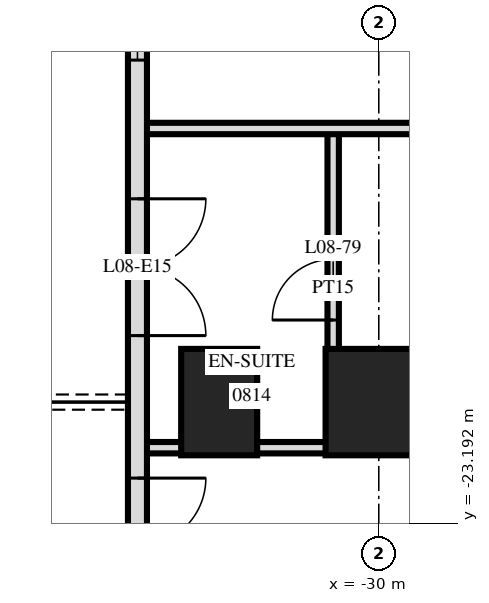
"""IFC4 building model, lengths in metres.
Left out: names, types, materials, properties, quantities, classifications, styles, units other than length and angle.
Written with IfcOpenShell. Run it as: python <this file> out.ifc"""

import sys

from ifc_helpers import new_model, si_unit, direction, frame, frame_2d, origin, origin_2d, place, context, subcontext, project, spatial, rectangle, extrude, element, fill, save


model = new_model("IFC4")
c1 = context("Model", 3, precision=1e-05, world=origin(), true_north=direction((0.0, 1.0)))
c2 = subcontext(c1, "Body", "Model", "MODEL_VIEW")
j1 = project(units=[si_unit("LENGTHUNIT", "METRE"), si_unit("PLANEANGLEUNIT", "RADIAN")], contexts=[c1])
p1 = place(None, origin())
s1 = spatial("IfcSite", under=j1, at=p1, CompositionType="ELEMENT")
p2 = place(p1, origin())
s2 = spatial("IfcBuilding", under=s1, at=p2, CompositionType="ELEMENT")
p3 = place(p2, frame((0.0, 0.0, 38.4)))
s3 = spatial("IfcBuildingStorey", under=s2, at=p3, CompositionType="ELEMENT", Elevation=38.4)
p4 = place(p3, frame((-32.1, -21.6, 0.0), z_axis=(0.0, 0.0, 1.0), x_axis=(0.0, 1.0, 0.0)))
e1 = element("IfcColumn", 1, at=p4, inside=s3, PredefinedType="COLUMN", context=c2, shape_type="SweptSolid", body=[
    extrude(rectangle(XDim=1.4, YDim=1.0, at=origin_2d()), origin(), (0.0, 0.0, 1.0), 3.6),
])
p5 = place(p3, frame((-30.0, -21.6, 0.0), z_axis=(0.0, 0.0, 1.0), x_axis=(1.0, 0.0, 0.0)))
e2 = element("IfcColumn", 2, at=p5, inside=s3, PredefinedType="COLUMN", context=c2, shape_type="SweptSolid", body=[
    extrude(rectangle(XDim=1.4, YDim=1.4, at=origin_2d()), origin(), (0.0, 0.0, 1.0), 3.6),
])
p6 = place(p3, frame((-33.175, -3.325, 0.0), z_axis=(0.0, 0.0, 1.0), x_axis=(0.0, -1.0, 0.0)))
e3 = element("IfcWall", 3, at=p6, inside=s3, PredefinedType="SOLIDWALL", context=c2, shape_type="SweptSolid", body=[
    extrude(rectangle(XDim=21.551, YDim=0.25, at=frame_2d((10.775, 0.0))), origin(), (0.0, 0.0, 1.0), 3.32),
])
p7 = place(p6, frame((6.575, 0.0, 0.0)))
e4 = element("IfcOpeningElement", 4, at=p7, cuts=e3, PredefinedType="OPENING", context=c2, shape_type="SweptSolid", body=[
    extrude(rectangle(XDim=1.8, YDim=2.4, at=frame_2d((0.9, 1.2))), frame((0.0, 0.135, 0.0), z_axis=(0.0, -1.0, 0.0), x_axis=(1.0, 0.0, 0.0)), (0.0, 0.0, 1.0), 0.27),
])
p8 = place(p6, frame((9.425, 0.0, 0.3)))
e5 = element("IfcOpeningElement", 5, at=p8, cuts=e3, PredefinedType="OPENING", context=c2, shape_type="SweptSolid", body=[
    extrude(rectangle(XDim=1.8, YDim=2.1, at=frame_2d((0.9, 1.05))), frame((0.0, 0.135, 0.0), z_axis=(0.0, -1.0, 0.0), x_axis=(1.0, 0.0, 0.0)), (0.0, 0.0, 1.0), 0.27),
])
p9 = place(p6, frame((12.575, 0.0, 0.3)))
e6 = element("IfcOpeningElement", 6, at=p9, cuts=e3, PredefinedType="OPENING", context=c2, shape_type="SweptSolid", body=[
    extrude(rectangle(XDim=1.2, YDim=2.1, at=frame_2d((0.6, 1.05))), frame((0.0, 0.135, 0.0), z_axis=(0.0, -1.0, 0.0), x_axis=(1.0, 0.0, 0.0)), (0.0, 0.0, 1.0), 0.27),
])
p10 = place(p6, frame((15.6, 0.0, 0.0)))
e7 = element("IfcOpeningElement", 7, at=p10, cuts=e3, PredefinedType="OPENING", context=c2, shape_type="SweptSolid", body=[
    extrude(rectangle(XDim=1.8, YDim=2.4, at=frame_2d((0.9, 1.2))), frame((0.0, 0.135, 0.0), z_axis=(0.0, -1.0, 0.0), x_axis=(1.0, 0.0, 0.0)), (0.0, 0.0, 1.0), 0.27),
])
p11 = place(p6, frame((19.275, 0.0, 0.0)))
e8 = element("IfcOpeningElement", 8, at=p11, cuts=e3, PredefinedType="OPENING", context=c2, shape_type="SweptSolid", body=[
    extrude(rectangle(XDim=1.8, YDim=2.4, at=frame_2d((0.9, 1.2))), frame((0.0, 0.135, 0.0), z_axis=(0.0, -1.0, 0.0), x_axis=(1.0, 0.0, 0.0)), (0.0, 0.0, 1.0), 0.27),
])
p12 = place(p3, frame((-30.6, -22.2, 0.0), z_axis=(0.0, 0.0, 1.0), x_axis=(0.0, 1.0, 0.0)))
e9 = element("IfcWall", 9, at=p12, inside=s3, PredefinedType="PARTITIONING", context=c2, shape_type="SweptSolid", body=[
    extrude(rectangle(XDim=4.2, YDim=0.15, at=frame_2d((2.1, 0.0))), origin(), (0.0, 0.0, 1.0), 3.32),
])
p13 = place(p12, frame((1.68, 0.0, 0.0)))
e10 = element("IfcOpeningElement", 10, at=p13, cuts=e9, PredefinedType="OPENING", context=c2, shape_type="SweptSolid", body=[
    extrude(rectangle(XDim=0.8, YDim=2.1, at=frame_2d((0.4, 1.05))), frame((0.0, 0.085, 0.0), z_axis=(0.0, -1.0, 0.0), x_axis=(1.0, 0.0, 0.0)), (0.0, 0.0, 1.0), 0.17),
])
p14 = place(p3, frame((-33.12, -22.2, 0.0), z_axis=(0.0, 0.0, 1.0), x_axis=(1.0, 0.0, 0.0)))
e11 = element("IfcWall", 11, at=p14, inside=s3, PredefinedType="PARTITIONING", context=c2, shape_type="SweptSolid", body=[
    extrude(rectangle(XDim=2.52, YDim=0.15, at=frame_2d((1.26, 0.0))), origin(), (0.0, 0.0, 1.0), 3.32),
])
p15 = place(p3, frame((-33.12, -18.0, 0.0), z_axis=(0.0, 0.0, 1.0), x_axis=(1.0, 0.0, 0.0)))
e12 = element("IfcWall", 12, at=p15, inside=s3, PredefinedType="PARTITIONING", context=c2, shape_type="SweptSolid", body=[
    extrude(rectangle(XDim=66.24, YDim=0.15, at=frame_2d((33.12, 0.0))), origin(), (0.0, 0.0, 1.0), 3.32),
])
p16 = place(p15, frame((12.27, 0.0, 0.0)))
e13 = element("IfcOpeningElement", 13, at=p16, cuts=e12, PredefinedType="OPENING", context=c2, shape_type="SweptSolid", body=[
    extrude(rectangle(XDim=1.0, YDim=2.1, at=frame_2d((0.5, 1.05))), frame((0.0, 0.085, 0.0), z_axis=(0.0, -1.0, 0.0), x_axis=(1.0, 0.0, 0.0)), (0.0, 0.0, 1.0), 0.17),
])
p17 = place(p15, frame((16.97, 0.0, 0.0)))
e14 = element("IfcOpeningElement", 14, at=p17, cuts=e12, PredefinedType="OPENING", context=c2, shape_type="SweptSolid", body=[
    extrude(rectangle(XDim=1.0, YDim=2.1, at=frame_2d((0.5, 1.05))), frame((0.0, 0.085, 0.0), z_axis=(0.0, -1.0, 0.0), x_axis=(1.0, 0.0, 0.0)), (0.0, 0.0, 1.0), 0.17),
])
p18 = place(p15, frame((18.27, 0.0, 0.0)))
e15 = element("IfcOpeningElement", 15, at=p18, cuts=e12, PredefinedType="OPENING", context=c2, shape_type="SweptSolid", body=[
    extrude(rectangle(XDim=1.0, YDim=2.1, at=frame_2d((0.5, 1.05))), frame((0.0, 0.085, 0.0), z_axis=(0.0, -1.0, 0.0), x_axis=(1.0, 0.0, 0.0)), (0.0, 0.0, 1.0), 0.17),
])
p19 = place(p15, frame((22.97, 0.0, 0.0)))
e16 = element("IfcOpeningElement", 16, at=p19, cuts=e12, PredefinedType="OPENING", context=c2, shape_type="SweptSolid", body=[
    extrude(rectangle(XDim=1.0, YDim=2.1, at=frame_2d((0.5, 1.05))), frame((0.0, 0.085, 0.0), z_axis=(0.0, -1.0, 0.0), x_axis=(1.0, 0.0, 0.0)), (0.0, 0.0, 1.0), 0.17),
])
p20 = place(p15, frame((24.27, 0.0, 0.0)))
e17 = element("IfcOpeningElement", 17, at=p20, cuts=e12, PredefinedType="OPENING", context=c2, shape_type="SweptSolid", body=[
    extrude(rectangle(XDim=1.0, YDim=2.1, at=frame_2d((0.5, 1.05))), frame((0.0, 0.085, 0.0), z_axis=(0.0, -1.0, 0.0), x_axis=(1.0, 0.0, 0.0)), (0.0, 0.0, 1.0), 0.17),
])
p21 = place(p15, frame((28.97, 0.0, 0.0)))
e18 = element("IfcOpeningElement", 18, at=p21, cuts=e12, PredefinedType="OPENING", context=c2, shape_type="SweptSolid", body=[
    extrude(rectangle(XDim=1.0, YDim=2.1, at=frame_2d((0.5, 1.05))), frame((0.0, 0.085, 0.0), z_axis=(0.0, -1.0, 0.0), x_axis=(1.0, 0.0, 0.0)), (0.0, 0.0, 1.0), 0.17),
])
p22 = place(p15, frame((30.27, 0.0, 0.0)))
e19 = element("IfcOpeningElement", 19, at=p22, cuts=e12, PredefinedType="OPENING", context=c2, shape_type="SweptSolid", body=[
    extrude(rectangle(XDim=1.0, YDim=2.1, at=frame_2d((0.5, 1.05))), frame((0.0, 0.085, 0.0), z_axis=(0.0, -1.0, 0.0), x_axis=(1.0, 0.0, 0.0)), (0.0, 0.0, 1.0), 0.17),
])
p23 = place(p15, frame((34.97, 0.0, 0.0)))
e20 = element("IfcOpeningElement", 20, at=p23, cuts=e12, PredefinedType="OPENING", context=c2, shape_type="SweptSolid", body=[
    extrude(rectangle(XDim=1.0, YDim=2.1, at=frame_2d((0.5, 1.05))), frame((0.0, 0.085, 0.0), z_axis=(0.0, -1.0, 0.0), x_axis=(1.0, 0.0, 0.0)), (0.0, 0.0, 1.0), 0.17),
])
p24 = place(p15, frame((37.27, 0.0, 0.0)))
e21 = element("IfcOpeningElement", 21, at=p24, cuts=e12, PredefinedType="OPENING", context=c2, shape_type="SweptSolid", body=[
    extrude(rectangle(XDim=1.0, YDim=2.1, at=frame_2d((0.5, 1.05))), frame((0.0, 0.085, 0.0), z_axis=(0.0, -1.0, 0.0), x_axis=(1.0, 0.0, 0.0)), (0.0, 0.0, 1.0), 0.17),
])
p25 = place(p15, frame((43.97, 0.0, 0.0)))
e22 = element("IfcOpeningElement", 22, at=p25, cuts=e12, PredefinedType="OPENING", context=c2, shape_type="SweptSolid", body=[
    extrude(rectangle(XDim=1.0, YDim=2.1, at=frame_2d((0.5, 1.05))), frame((0.0, 0.085, 0.0), z_axis=(0.0, -1.0, 0.0), x_axis=(1.0, 0.0, 0.0)), (0.0, 0.0, 1.0), 0.17),
])
p26 = place(p15, frame((45.27, 0.0, 0.0)))
e23 = element("IfcOpeningElement", 23, at=p26, cuts=e12, PredefinedType="OPENING", context=c2, shape_type="SweptSolid", body=[
    extrude(rectangle(XDim=1.0, YDim=2.1, at=frame_2d((0.5, 1.05))), frame((0.0, 0.085, 0.0), z_axis=(0.0, -1.0, 0.0), x_axis=(1.0, 0.0, 0.0)), (0.0, 0.0, 1.0), 0.17),
])
p27 = place(p15, frame((51.22, 0.0, 0.0)))
e24 = element("IfcOpeningElement", 24, at=p27, cuts=e12, PredefinedType="OPENING", context=c2, shape_type="SweptSolid", body=[
    extrude(rectangle(XDim=1.0, YDim=2.1, at=frame_2d((0.5, 1.05))), frame((0.0, 0.085, 0.0), z_axis=(0.0, -1.0, 0.0), x_axis=(1.0, 0.0, 0.0)), (0.0, 0.0, 1.0), 0.17),
])
p28 = place(p15, frame((54.27, 0.0, 0.0)))
e25 = element("IfcOpeningElement", 25, at=p28, cuts=e12, PredefinedType="OPENING", context=c2, shape_type="SweptSolid", body=[
    extrude(rectangle(XDim=1.0, YDim=2.1, at=frame_2d((0.5, 1.05))), frame((0.0, 0.085, 0.0), z_axis=(0.0, -1.0, 0.0), x_axis=(1.0, 0.0, 0.0)), (0.0, 0.0, 1.0), 0.17),
])
p29 = place(p15, frame((6.07, 0.0, 0.0)))
e26 = element("IfcOpeningElement", 26, at=p29, cuts=e12, PredefinedType="OPENING", context=c2, shape_type="SweptSolid", body=[
    extrude(rectangle(XDim=1.0, YDim=2.1, at=frame_2d((0.5, 1.05))), frame((0.0, 0.085, 0.0), z_axis=(0.0, -1.0, 0.0), x_axis=(1.0, 0.0, 0.0)), (0.0, 0.0, 1.0), 0.17),
])
p30 = place(p15, frame((63.37, 0.0, 0.0)))
e27 = element("IfcOpeningElement", 27, at=p30, cuts=e12, PredefinedType="OPENING", context=c2, shape_type="SweptSolid", body=[
    extrude(rectangle(XDim=1.0, YDim=2.1, at=frame_2d((0.5, 1.05))), frame((0.0, 0.085, 0.0), z_axis=(0.0, -1.0, 0.0), x_axis=(1.0, 0.0, 0.0)), (0.0, 0.0, 1.0), 0.17),
])
p31 = place(p9, origin())
e28 = element("IfcWindow", 28, at=p31, inside=s3, PartitioningType="SINGLE_PANEL", PredefinedType="WINDOW", context=c2, shape_type="SweptSolid", body=[
    extrude(rectangle(XDim=1.2, YDim=2.1, at=frame_2d((0.6, 1.05))), frame((0.0, 0.03, 0.0), z_axis=(0.0, -1.0, 0.0), x_axis=(1.0, 0.0, 0.0)), (0.0, 0.0, 1.0), 0.06),
])
fill(e6, e28)
p32 = place(p10, origin())
e29 = element("IfcDoor", 29, at=p32, inside=s3, OperationType="DOUBLE_DOOR_SINGLE_SWING", PredefinedType="DOOR", context=c2, shape_type="SweptSolid", body=[
    extrude(rectangle(XDim=1.8, YDim=2.4, at=frame_2d((0.9, 1.2))), frame((0.0, 0.025, 0.0), z_axis=(0.0, -1.0, 0.0), x_axis=(1.0, 0.0, 0.0)), (0.0, 0.0, 1.0), 0.05),
])
fill(e7, e29)
p33 = place(p11, origin())
e30 = element("IfcDoor", 30, at=p33, inside=s3, OperationType="DOUBLE_DOOR_SINGLE_SWING", PredefinedType="DOOR", context=c2, shape_type="SweptSolid", body=[
    extrude(rectangle(XDim=1.8, YDim=2.4, at=frame_2d((0.9, 1.2))), frame((0.0, 0.025, 0.0), z_axis=(0.0, -1.0, 0.0), x_axis=(1.0, 0.0, 0.0)), (0.0, 0.0, 1.0), 0.05),
])
fill(e8, e30)
p34 = place(p13, origin())
e31 = element("IfcDoor", 31, at=p34, inside=s3, OperationType="SINGLE_SWING_RIGHT", PredefinedType="DOOR", context=c2, shape_type="SweptSolid", body=[
    extrude(rectangle(XDim=0.8, YDim=2.1, at=frame_2d((0.4, 1.05))), frame((0.0, 0.025, 0.0), z_axis=(0.0, -1.0, 0.0), x_axis=(1.0, 0.0, 0.0)), (0.0, 0.0, 1.0), 0.05),
])
fill(e10, e31)
save(model, sys.argv[1])
